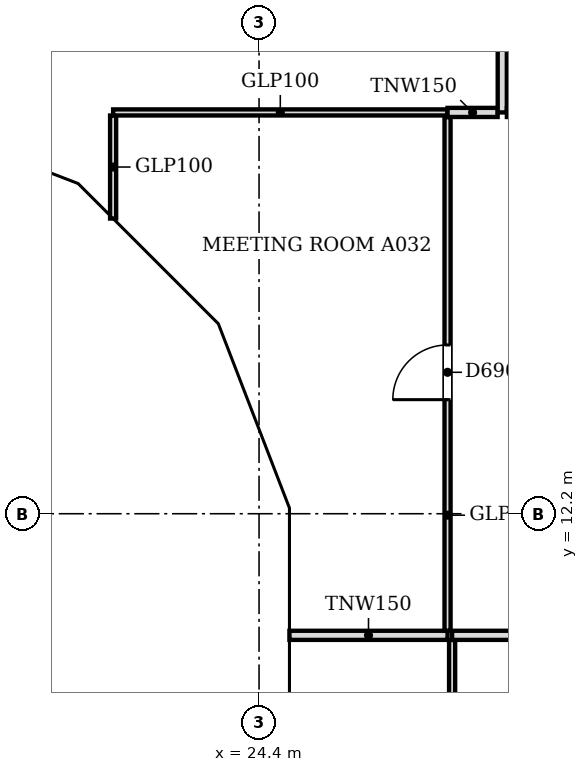
"""IFC4 building model, lengths in metres.
Left out: names, types, materials, properties, quantities, classifications, styles, units other than length and angle.
Written with IfcOpenShell. Run it as: python <this file> out.ifc"""

import sys

from ifc_helpers import new_model, si_unit, direction, frame, frame_2d, origin, place, context, subcontext, project, spatial, polyline, rectangle, outline, extrude, faceted_brep, source, transform, mapped, element, fill, save


model = new_model("IFC4")
c1 = context("Model", 3, precision=1e-05, world=origin(), true_north=direction((0.0, 1.0)))
c2 = subcontext(c1, "Body", "Model", "MODEL_VIEW")
j1 = project(units=[si_unit("LENGTHUNIT", "METRE"), si_unit("PLANEANGLEUNIT", "RADIAN")], contexts=[c1])
p1 = place(None, origin())
s1 = spatial("IfcSite", under=j1, at=p1, CompositionType="ELEMENT")
p2 = place(p1, origin())
s2 = spatial("IfcBuilding", under=s1, at=p2, CompositionType="ELEMENT")
p3 = place(p2, frame((0.0, 0.0, 99.0)))
s3 = spatial("IfcBuildingStorey", under=s2, at=p3, CompositionType="ELEMENT", Elevation=99.0)
m1 = source(origin(), c2, "Body", "Brep", [
    faceted_brep([(0.093, -0.25, 0.056), (3.143, -0.25, 3.736), (3.143, -0.25, 3.864), (0.093, -0.25, 7.544), (0.0, 0.25, 7.543), (0.047, 0.25, 7.6), (3.196, 0.25, 3.8), (0.047, 0.25, 0.0), (0.0, 0.25, 0.057), (3.196, -0.0, 3.8), (0.047, 0.0, 0.0), (0.047, 0.0, 7.6)], [[[0, 1, 2, 3]], [[4, 5, 6, 7, 8]], [[7, 6, 9, 1, 0, 10]], [[6, 5, 11, 3, 2, 9]], [[5, 4, 11]], [[8, 7, 10]], [[8, 10, 0, 3, 11, 4]], [[1, 9, 2]]]),
])
p4 = place(p3, frame((18.303, 18.567, -3.8), z_axis=(0.0, 0.0, 1.0), x_axis=(0.932978940178, -0.359930961693, 0.0)))
e1 = element("IfcWall", 1, at=p4, inside=s3, PredefinedType="SOLIDWALL", context=c2, shape_type="MappedRepresentation", body=[
    mapped(m1, transform((0.0, 0.0, 0.0), scale=1.0)),
])
m2 = source(origin(), c2, "Body", "SweptSolid", [
    extrude(outline(polyline([(0.247, 0.633), (2.871, 3.8), (0.247, 6.967), (0.247, 0.633)])), frame((0.0, 0.26, 0.0), z_axis=(0.0, -1.0, 0.0), x_axis=(1.0, 0.0, 0.0)), (0.0, 0.0, 1.0), 0.52),
])
p5 = place(p4, origin())
e2 = element("IfcOpeningElement", 2, at=p5, cuts=e1, PredefinedType="OPENING", context=c2, shape_type="MappedRepresentation", body=[
    mapped(m2, transform((0.0, 0.0, 0.0), scale=1.0)),
])
m3 = source(origin(), c2, "Body", "Brep", [
    faceted_brep([(3.103, -0.25, 7.536), (0.053, -0.25, 3.864), (0.053, -0.25, 3.736), (3.103, -0.25, 0.064), (0.0, 0.25, 3.8), (3.156, 0.25, 7.6), (3.209, 0.25, 7.536), (3.209, 0.25, 0.064), (3.156, 0.25, 0.0), (3.156, -0.0, 0.0), (3.156, -0.0, 7.6), (0.0, 0.0, 3.8)], [[[0, 1, 2, 3]], [[4, 5, 6, 7, 8]], [[8, 7, 9]], [[6, 5, 10]], [[5, 4, 11, 1, 0, 10]], [[4, 8, 9, 3, 2, 11]], [[11, 2, 1]], [[3, 9, 7, 6, 10, 0]]]),
])
p6 = place(p3, frame((21.285, 17.417, -3.8), z_axis=(0.0, 0.0, 1.0), x_axis=(0.707106781187, -0.707106781187, 0.0)))
e3 = element("IfcWall", 3, at=p6, inside=s3, PredefinedType="SOLIDWALL", context=c2, shape_type="MappedRepresentation", body=[
    mapped(m3, transform((0.0, 0.0, 0.0), scale=1.0)),
])
m4 = source(origin(), c2, "Body", "SweptSolid", [
    extrude(outline(polyline([(2.956, 6.968), (0.325, 3.8), (2.956, 0.632), (2.956, 6.968)])), frame((0.0, 0.26, 0.0), z_axis=(0.0, -1.0, 0.0), x_axis=(1.0, 0.0, 0.0)), (0.0, 0.0, 1.0), 0.52),
])
p7 = place(p6, origin())
e4 = element("IfcOpeningElement", 4, at=p7, cuts=e3, PredefinedType="OPENING", context=c2, shape_type="MappedRepresentation", body=[
    mapped(m4, transform((0.0, 0.0, 0.0), scale=1.0)),
])
m5 = source(origin(), c2, "Body", "Brep", [
    faceted_brep([(0.106, -0.25, 0.064), (3.156, -0.25, 3.744), (3.156, -0.25, 3.856), (0.106, -0.25, 7.536), (0.0, 0.25, 7.536), (0.053, 0.25, 7.6), (3.202, 0.25, 3.8), (0.053, 0.25, 0.0), (0.0, 0.25, 0.064), (3.202, -0.0, 3.8), (0.053, 0.0, 0.0), (0.053, 0.0, 7.6)], [[[0, 1, 2, 3]], [[4, 5, 6, 7, 8]], [[7, 6, 9, 1, 0, 10]], [[6, 5, 11, 3, 2, 9]], [[5, 4, 11]], [[8, 7, 10]], [[8, 10, 0, 3, 11, 4]], [[1, 9, 2]]]),
])
p8 = place(p3, frame((23.497, 15.234, -3.8), z_axis=(0.0, 0.0, 1.0), x_axis=(0.359913782069, -0.932985567668, 0.0)))
e5 = element("IfcWall", 5, at=p8, inside=s3, PredefinedType="SOLIDWALL", context=c2, shape_type="MappedRepresentation", body=[
    mapped(m5, transform((0.0, 0.0, 0.0), scale=1.0)),
])
m6 = source(origin(), c2, "Body", "SweptSolid", [
    extrude(outline(polyline([(0.253, 0.633), (2.878, 3.8), (0.253, 6.967), (0.253, 0.633)])), frame((0.0, 0.26, 0.0), z_axis=(0.0, -1.0, 0.0), x_axis=(1.0, 0.0, 0.0)), (0.0, 0.0, 1.0), 0.52),
])
p9 = place(p8, origin())
e6 = element("IfcOpeningElement", 6, at=p9, cuts=e5, PredefinedType="OPENING", context=c2, shape_type="MappedRepresentation", body=[
    mapped(m6, transform((0.0, 0.0, 0.0), scale=1.0)),
])
m7 = source(origin(), c2, "Body", "Brep", [
    faceted_brep([(3.096, -0.25, 0.0), (6.1, -0.25, 3.8), (3.096, -0.25, 7.6), (0.047, -0.25, 3.857), (0.047, -0.25, 3.743), (0.0, 0.25, 3.8), (3.096, 0.25, 7.6), (6.053, 0.25, 3.859), (6.053, 0.25, 3.741), (3.096, 0.25, 0.0), (6.1, -0.0, 3.8), (0.0, 0.0, 3.8)], [[[0, 1, 2, 3, 4]], [[5, 6, 7, 8, 9]], [[9, 8, 10, 1, 0]], [[7, 6, 2, 1, 10]], [[6, 5, 11, 3, 2]], [[5, 9, 0, 4, 11]], [[11, 4, 3]], [[10, 8, 7]]]),
])
p10 = place(p3, frame((24.65, 12.247, -3.8), z_axis=(0.0, 0.0, 1.0), x_axis=(0.0, -1.0, 0.0)))
e7 = element("IfcWall", 7, at=p10, inside=s3, PredefinedType="SOLIDWALL", context=c2, shape_type="MappedRepresentation", body=[
    mapped(m7, transform((0.0, 0.0, 0.0), scale=1.0)),
])
m8 = source(origin(), c2, "Body", "SweptSolid", [
    extrude(outline(polyline([(3.094, 0.399), (5.781, 3.8), (3.094, 7.201), (0.323, 3.8), (3.094, 0.399)])), frame((0.0, 0.26, 0.0), z_axis=(0.0, -1.0, 0.0), x_axis=(1.0, 0.0, 0.0)), (0.0, 0.0, 1.0), 0.52),
])
p11 = place(p10, origin())
e8 = element("IfcOpeningElement", 8, at=p11, cuts=e7, PredefinedType="OPENING", context=c2, shape_type="MappedRepresentation", body=[
    mapped(m8, transform((0.0, 0.0, 0.0), scale=1.0)),
])
p12 = place(p2, frame((0.0, 0.0, 102.8)))
s4 = spatial("IfcBuildingStorey", under=s2, at=p12, CompositionType="ELEMENT", Elevation=102.8)
m9 = source(origin(), c2, "Body", "Brep", [
    faceted_brep([(3.096, -0.25, 7.536), (0.047, -0.25, 3.856), (0.047, -0.25, 3.744), (3.096, -0.25, 0.064), (0.0, 0.25, 3.8), (3.149, 0.25, 7.6), (3.202, 0.25, 7.536), (3.202, 0.25, 0.064), (3.149, 0.25, 0.0), (3.149, -0.0, 0.0), (3.149, -0.0, 7.6), (0.0, 0.0, 3.8)], [[[0, 1, 2, 3]], [[4, 5, 6, 7, 8]], [[8, 7, 9]], [[6, 5, 10]], [[5, 4, 11, 1, 0, 10]], [[4, 8, 9, 3, 2, 11]], [[11, 2, 1]], [[3, 9, 7, 6, 10, 0]]]),
])
p13 = place(p12, frame((18.346, 18.55, -3.8), z_axis=(0.0, 0.0, 1.0), x_axis=(0.932985567668, -0.359913782069, 0.0)))
e9 = element("IfcWall", 9, at=p13, inside=s4, PredefinedType="SOLIDWALL", context=c2, shape_type="MappedRepresentation", body=[
    mapped(m9, transform((0.0, 0.0, 0.0), scale=1.0)),
])
m10 = source(origin(), c2, "Body", "SweptSolid", [
    extrude(outline(polyline([(2.949, 6.967), (0.325, 3.8), (2.949, 0.633), (2.949, 6.967)])), frame((0.0, 0.26, 0.0), z_axis=(0.0, -1.0, 0.0), x_axis=(1.0, 0.0, 0.0)), (0.0, 0.0, 1.0), 0.52),
])
p14 = place(p13, origin())
e10 = element("IfcOpeningElement", 10, at=p14, cuts=e9, PredefinedType="OPENING", context=c2, shape_type="MappedRepresentation", body=[
    mapped(m10, transform((0.0, 0.0, 0.0), scale=1.0)),
])
m11 = source(origin(), c2, "Body", "Brep", [
    faceted_brep([(0.106, -0.25, 0.064), (3.156, -0.25, 3.736), (3.156, -0.25, 3.864), (0.106, -0.25, 7.536), (0.0, 0.25, 7.536), (0.053, 0.25, 7.6), (3.209, 0.25, 3.8), (0.053, 0.25, 0.0), (0.0, 0.25, 0.064), (3.209, -0.0, 3.8), (0.053, 0.0, 0.0), (0.053, 0.0, 7.6)], [[[0, 1, 2, 3]], [[4, 5, 6, 7, 8]], [[7, 6, 9, 1, 0, 10]], [[6, 5, 11, 3, 2, 9]], [[5, 4, 11]], [[8, 7, 10]], [[8, 10, 0, 3, 11, 4]], [[1, 9, 2]]]),
])
p15 = place(p12, frame((21.248, 17.454, -3.8), z_axis=(0.0, 0.0, 1.0), x_axis=(0.707106781187, -0.707106781187, 0.0)))
e11 = element("IfcWall", 11, at=p15, inside=s4, PredefinedType="SOLIDWALL", context=c2, shape_type="MappedRepresentation", body=[
    mapped(m11, transform((0.0, 0.0, 0.0), scale=1.0)),
])
m12 = source(origin(), c2, "Body", "SweptSolid", [
    extrude(outline(polyline([(0.253, 0.632), (2.884, 3.8), (0.253, 6.968), (0.253, 0.632)])), frame((0.0, 0.26, 0.0), z_axis=(0.0, -1.0, 0.0), x_axis=(1.0, 0.0, 0.0)), (0.0, 0.0, 1.0), 0.52),
])
p16 = place(p15, origin())
e12 = element("IfcOpeningElement", 12, at=p16, cuts=e11, PredefinedType="OPENING", context=c2, shape_type="MappedRepresentation", body=[
    mapped(m12, transform((0.0, 0.0, 0.0), scale=1.0)),
])
m13 = source(origin(), c2, "Body", "Brep", [
    faceted_brep([(3.103, -0.25, 7.544), (0.053, -0.25, 3.864), (0.053, -0.25, 3.736), (3.103, -0.25, 0.056), (0.0, 0.25, 3.8), (3.149, 0.25, 7.6), (3.196, 0.25, 7.543), (3.196, 0.25, 0.057), (3.149, 0.25, 0.0), (3.149, -0.0, 0.0), (3.149, -0.0, 7.6), (0.0, 0.0, 3.8)], [[[0, 1, 2, 3]], [[4, 5, 6, 7, 8]], [[8, 7, 9]], [[6, 5, 10]], [[5, 4, 11, 1, 0, 10]], [[4, 8, 9, 3, 2, 11]], [[11, 2, 1]], [[3, 9, 7, 6, 10, 0]]]),
])
p17 = place(p12, frame((23.517, 15.185, -3.8), z_axis=(0.0, 0.0, 1.0), x_axis=(0.359864468756, -0.933004589553, 0.0)))
e13 = element("IfcWall", 13, at=p17, inside=s4, PredefinedType="SOLIDWALL", context=c2, shape_type="MappedRepresentation", body=[
    mapped(m13, transform((0.0, 0.0, 0.0), scale=1.0)),
])
p18 = place(p17, origin())
e14 = element("IfcOpeningElement", 14, at=p18, cuts=e13, PredefinedType="OPENING", context=c2, shape_type="MappedRepresentation", body=[
    mapped(m10, transform((0.0, 0.0, 0.0), scale=1.0)),
])
m14 = source(origin(), c2, "Body", "Brep", [
    faceted_brep([(0.093, -0.25, 0.057), (3.143, -0.25, 3.8), (0.093, -0.25, 7.543), (0.0, 0.25, 7.544), (0.047, 0.25, 7.6), (3.143, 0.25, 3.8), (0.047, 0.25, 0.0), (0.0, 0.25, 0.056), (0.047, 0.0, 0.0), (0.047, 0.0, 7.6)], [[[0, 1, 2]], [[3, 4, 5, 6, 7]], [[6, 5, 1, 0, 8]], [[5, 4, 9, 2, 1]], [[4, 3, 9]], [[7, 6, 8]], [[7, 8, 0, 2, 9, 3]]]),
])
p19 = place(p12, frame((24.65, 12.293, -3.8), z_axis=(0.0, 0.0, 1.0), x_axis=(0.0, -1.0, 0.0)))
e15 = element("IfcWall", 15, at=p19, inside=s4, PredefinedType="SOLIDWALL", context=c2, shape_type="MappedRepresentation", body=[
    mapped(m14, transform((0.0, 0.0, 0.0), scale=1.0)),
])
m15 = source(origin(), c2, "Body", "SweptSolid", [
    extrude(outline(polyline([(0.247, 0.641), (2.821, 3.8), (0.247, 6.959), (0.247, 0.641)])), frame((0.0, 0.26, 0.0), z_axis=(0.0, -1.0, 0.0), x_axis=(1.0, 0.0, 0.0)), (0.0, 0.0, 1.0), 0.52),
])
p20 = place(p19, origin())
e16 = element("IfcOpeningElement", 16, at=p20, cuts=e15, PredefinedType="OPENING", context=c2, shape_type="MappedRepresentation", body=[
    mapped(m15, transform((0.0, 0.0, 0.0), scale=1.0)),
])
p21 = place(p3, frame((27.575, 4.2, 0.0), z_axis=(0.0, 0.0, 1.0), x_axis=(0.0, 1.0, 0.0)))
e17 = element("IfcWall", 17, at=p21, inside=s3, PredefinedType="PARTITIONING", context=c2, shape_type="SweptSolid", body=[
    extrude(rectangle(XDim=5.924, YDim=0.1, at=frame_2d((2.962, 0.0))), origin(), (0.0, 0.0, 1.0), 3.067),
])
m16 = source(origin(), c2, "Body", "SweptSolid", [
    extrude(rectangle(XDim=0.9, YDim=2.1, at=frame_2d((0.45, 1.05))), frame((0.0, 0.06, 0.0), z_axis=(0.0, -1.0, 0.0), x_axis=(1.0, 0.0, 0.0)), (0.0, 0.0, 1.0), 0.12),
])
p22 = place(p21, frame((2.5, 0.0, 0.0)))
e18 = element("IfcOpeningElement", 18, at=p22, cuts=e17, PredefinedType="OPENING", context=c2, shape_type="MappedRepresentation", body=[
    mapped(m16, transform((0.0, 0.0, 0.0), scale=1.0)),
])
p23 = place(p3, frame((24.9, 10.2, 0.0), z_axis=(0.0, 0.0, 1.0), x_axis=(1.0, 0.0, 0.0)))
e19 = element("IfcWall", 19, at=p23, inside=s3, PredefinedType="PARTITIONING", context=c2, shape_type="SweptSolid", body=[
    extrude(rectangle(XDim=2.6, YDim=0.15, at=frame_2d((1.3, 0.0))), origin(), (0.0, 0.0, 1.0), 3.067),
])
p24 = place(p3, frame((27.575, 10.2, 0.0), z_axis=(0.0, 0.0, 1.0), x_axis=(1.0, 0.0, 0.0)))
e20 = element("IfcWall", 20, at=p24, inside=s3, PredefinedType="PARTITIONING", context=c2, shape_type="SweptSolid", body=[
    extrude(rectangle(XDim=17.349, YDim=0.15, at=frame_2d((8.675, 0.0))), origin(), (0.0, 0.0, 1.0), 3.067),
])
p25 = place(p3, frame((27.5, 10.276, 0.0), z_axis=(0.0, 0.0, 1.0), x_axis=(0.0, 1.0, 0.0)))
e21 = element("IfcWall", 21, at=p25, inside=s3, PredefinedType="PARTITIONING", context=c2, shape_type="SweptSolid", body=[
    extrude(rectangle(XDim=8.448, YDim=0.1, at=frame_2d((4.224, 0.0))), origin(), (0.0, 0.0, 1.0), 3.067),
])
p26 = place(p25, frame((3.8, 0.0, 0.0)))
e22 = element("IfcOpeningElement", 22, at=p26, cuts=e21, PredefinedType="OPENING", context=c2, shape_type="MappedRepresentation", body=[
    mapped(m16, transform((0.0, 0.0, 0.0), scale=1.0)),
])
p27 = place(p3, frame((22.0, 17.055, 0.0), z_axis=(0.0, 0.0, 1.0), x_axis=(0.0, 1.0, 0.0)))
e23 = element("IfcWall", 23, at=p27, inside=s3, PredefinedType="PARTITIONING", context=c2, shape_type="SweptSolid", body=[
    extrude(rectangle(XDim=1.694, YDim=0.1, at=frame_2d((0.847, 0.0))), origin(), (0.0, 0.0, 1.0), 3.067),
])
p28 = place(p3, frame((22.0, 18.8, 0.0), z_axis=(0.0, 0.0, 1.0), x_axis=(1.0, 0.0, 0.0)))
e24 = element("IfcWall", 24, at=p28, inside=s3, PredefinedType="PARTITIONING", context=c2, shape_type="SweptSolid", body=[
    extrude(rectangle(XDim=5.499, YDim=0.1, at=frame_2d((2.75, 0.0))), origin(), (0.0, 0.0, 1.0), 3.067),
])
p29 = place(p3, frame((27.5, 18.8, 0.0), z_axis=(0.0, 0.0, 1.0), x_axis=(1.0, 0.0, 0.0)))
e25 = element("IfcWall", 25, at=p29, inside=s3, PredefinedType="PARTITIONING", context=c2, shape_type="SweptSolid", body=[
    extrude(rectangle(XDim=0.824, YDim=0.15, at=frame_2d((0.412, 0.0))), origin(), (0.0, 0.0, 1.0), 3.067),
])
p30 = place(p3, frame((28.4, 18.8, 0.0), z_axis=(0.0, 0.0, 1.0), x_axis=(0.0, 1.0, 0.0)))
e26 = element("IfcWall", 26, at=p30, inside=s3, PredefinedType="PARTITIONING", context=c2, shape_type="SweptSolid", body=[
    extrude(rectangle(XDim=26.824, YDim=0.15, at=frame_2d((13.412, 0.0))), origin(), (0.0, 0.0, 1.0), 3.067),
])
m17 = source(origin(), c2, "Body", "SweptSolid", [
    extrude(rectangle(XDim=0.9, YDim=2.1, at=frame_2d((0.45, 1.05))), frame((0.0, 0.085, 0.0), z_axis=(0.0, -1.0, 0.0), x_axis=(1.0, 0.0, 0.0)), (0.0, 0.0, 1.0), 0.17),
])
p31 = place(p30, frame((1.3, 0.0, 0.0)))
e27 = element("IfcOpeningElement", 27, at=p31, cuts=e26, PredefinedType="OPENING", context=c2, shape_type="MappedRepresentation", body=[
    mapped(m17, transform((0.0, 0.0, 0.0), scale=1.0)),
])
m18 = source(origin(), c2, "Body", "SweptSolid", [
    extrude(rectangle(XDim=1.0, YDim=2.1, at=frame_2d((0.5, 1.05))), frame((0.0, 0.085, 0.0), z_axis=(0.0, -1.0, 0.0), x_axis=(1.0, 0.0, 0.0)), (0.0, 0.0, 1.0), 0.17),
])
p32 = place(p30, frame((23.351, 0.0, 0.0)))
e28 = element("IfcOpeningElement", 28, at=p32, cuts=e26, PredefinedType="OPENING", context=c2, shape_type="MappedRepresentation", body=[
    mapped(m18, transform((0.0, 0.0, 0.0), scale=1.0)),
])
p33 = place(p30, frame((8.2, 0.0, 0.0)))
e29 = element("IfcOpeningElement", 29, at=p33, cuts=e26, PredefinedType="OPENING", context=c2, shape_type="MappedRepresentation", body=[
    mapped(m17, transform((0.0, 0.0, 0.0), scale=1.0)),
])
p34 = place(p30, frame((15.8, 0.0, 0.0)))
e30 = element("IfcOpeningElement", 30, at=p34, cuts=e26, PredefinedType="OPENING", context=c2, shape_type="MappedRepresentation", body=[
    mapped(m18, transform((0.0, 0.0, 0.0), scale=1.0)),
])
p35 = place(p3, frame((28.476, 18.8, 0.0), z_axis=(0.0, 0.0, 1.0), x_axis=(1.0, 0.0, 0.0)))
e31 = element("IfcWall", 31, at=p35, inside=s3, PredefinedType="PARTITIONING", context=c2, shape_type="SweptSolid", body=[
    extrude(rectangle(XDim=1.948, YDim=0.15, at=frame_2d((0.974, 0.0))), origin(), (0.0, 0.0, 1.0), 3.067),
])
m19 = source(origin(), c2, "Body", "SweptSolid", [
    extrude(rectangle(XDim=0.9, YDim=2.1, at=frame_2d((0.45, 1.05))), frame((0.0, 0.025, 0.0), z_axis=(0.0, -1.0, 0.0), x_axis=(1.0, 0.0, 0.0)), (0.0, 0.0, 1.0), 0.05),
])
p36 = place(p26, origin())
e32 = element("IfcDoor", 32, at=p36, inside=s3, OperationType="SINGLE_SWING_LEFT", PredefinedType="DOOR", context=c2, shape_type="MappedRepresentation", body=[
    mapped(m19, transform((0.0, 0.0, 0.0), scale=1.0)),
])
fill(e22, e32)
save(model, sys.argv[1])
